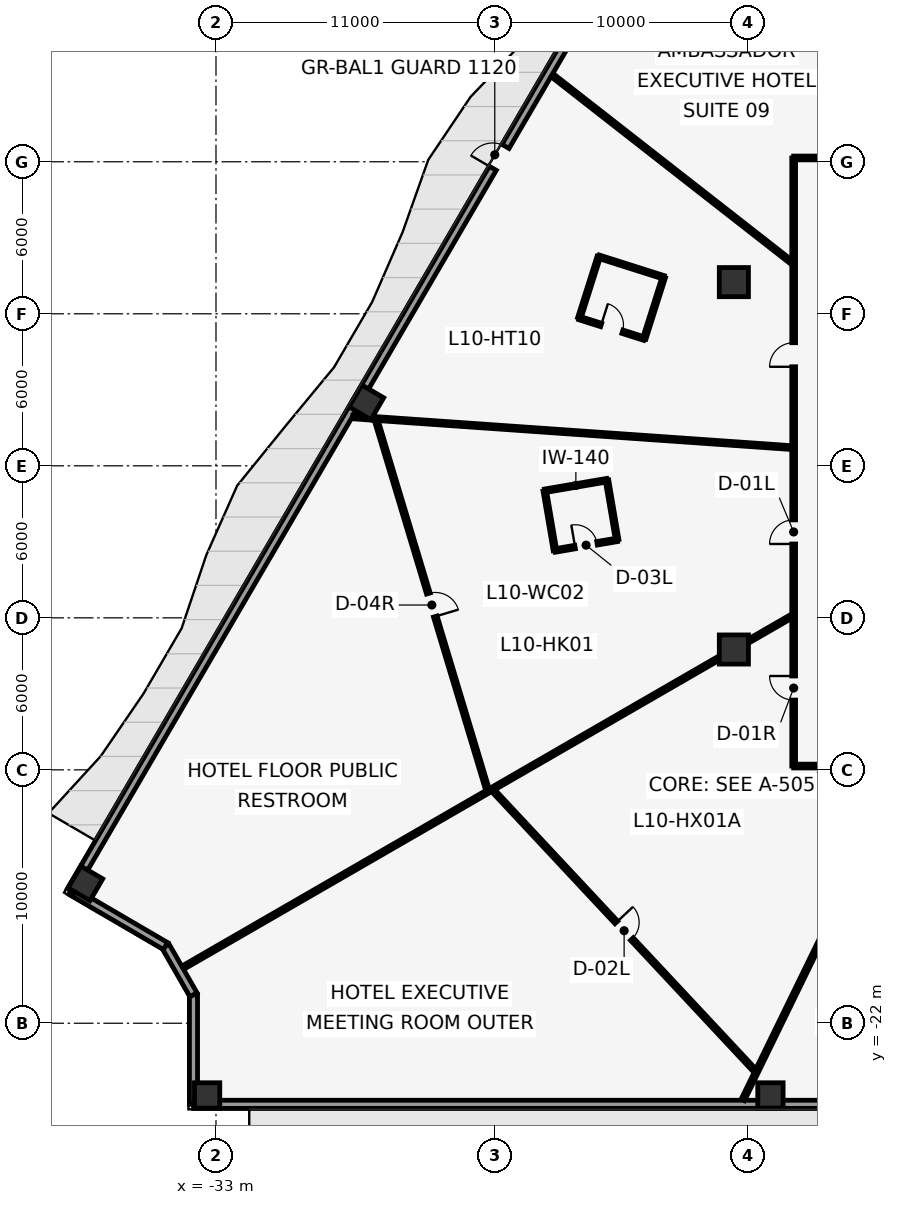
"""IFC4 building model, lengths in metres.
Left out: names, types, materials, properties, quantities, classifications, styles, units other than length and angle.
Written with IfcOpenShell. Run it as: python <this file> out.ifc"""

import sys

from ifc_helpers import new_model, si_unit, direction, frame, frame_2d, origin, origin_2d, place, context, subcontext, project, spatial, rectangle, hollow_rectangle, extrude, element, fill, save


model = new_model("IFC4")
c1 = context("Model", 3, precision=1e-05, world=origin(), true_north=direction((0.0, 1.0)))
c2 = subcontext(c1, "Body", "Model", "MODEL_VIEW")
j1 = project(units=[si_unit("LENGTHUNIT", "METRE"), si_unit("PLANEANGLEUNIT", "RADIAN")], contexts=[c1])
p1 = place(None, origin())
s1 = spatial("IfcSite", under=j1, at=p1, CompositionType="ELEMENT")
p2 = place(p1, origin())
s2 = spatial("IfcBuilding", under=s1, at=p2, CompositionType="ELEMENT")
p3 = place(p2, frame((0.0, 0.0, 50.4)))
s3 = spatial("IfcBuildingStorey", under=s2, at=p3, CompositionType="ELEMENT", Elevation=50.4)
for number, where, z_axis, x_axis in (
    (1, (-12.56, -7.25, 0.0), (0.0, 0.0, 1.0), (1.0, 0.0, 0.0)),
    (2, (-12.56, 7.25, 0.0), (0.0, 0.0, 1.0), (1.0, 0.0, 0.0)),
):
    element("IfcColumn", number, at=place(p3, frame(where, z_axis=z_axis, x_axis=x_axis)), inside=s3, PredefinedType="COLUMN", context=c2, shape_type="SweptSolid", body=[
        extrude(rectangle(XDim=1.15, YDim=1.15, at=origin_2d()), origin(), (0.0, 0.0, 1.0), 4.0),
    ])
for number, where, z_axis, x_axis in (
    (3, (-27.065, 2.506, 0.0), (0.0, 0.0, 1.0), (0.504, 0.863, 0.0)),
    (4, (-38.154, -16.481, 0.0), (0.0, 0.0, 1.0), (0.504, 0.863, 0.0)),
    (5, (-33.35, -24.85, 0.0), (0.0, 0.0, 1.0), (1.0, 0.0, 0.0)),
    (6, (-11.117, -24.85, 0.0), (0.0, 0.0, 1.0), (1.0, 0.0, 0.0)),
):
    element("IfcColumn", number, at=place(p3, frame(where, z_axis=z_axis, x_axis=x_axis)), inside=s3, PredefinedType="COLUMN", context=c2, shape_type="SweptSolid", body=[
        extrude(hollow_rectangle(XDim=1.0, YDim=1.0, WallThickness=0.06, at=origin_2d()), origin(), (0.0, 0.0, 1.0), 4.0),
    ])
p4 = place(p3, frame((33.888, -25.2, 0.0), z_axis=(0.0, 0.0, 1.0), x_axis=(-1.0, 0.0, 0.0)))
e7 = element("IfcWall", 7, at=p4, inside=s3, PredefinedType="STANDARD", context=c2, shape_type="SweptSolid", body=[
    extrude(rectangle(XDim=67.776, YDim=0.32, at=frame_2d((33.888, 0.0))), origin(), (0.0, 0.0, 1.0), 3.75),
])
p5 = place(p4, frame((33.388, 0.0, 0.0)))
e8 = element("IfcOpeningElement", 8, at=p5, cuts=e7, PredefinedType="OPENING", context=c2, shape_type="SweptSolid", body=[
    extrude(rectangle(XDim=1.0, YDim=2.15, at=frame_2d((0.5, 1.075))), frame((0.0, 0.17, 0.0), z_axis=(0.0, -1.0, 0.0), x_axis=(1.0, 0.0, 0.0)), (0.0, 0.0, 1.0), 0.34),
])
p6 = place(p3, frame((-33.888, -25.2, 0.0), z_axis=(0.0, 0.0, 1.0), x_axis=(0.0, 1.0, 0.0)))
e9 = element("IfcWall", 9, at=p6, inside=s3, PredefinedType="STANDARD", context=c2, shape_type="SweptSolid", body=[
    extrude(rectangle(XDim=4.324, YDim=0.32, at=frame_2d((2.162, 0.0))), origin(), (0.0, 0.0, 1.0), 3.75),
])
p7 = place(p3, frame((-33.888, -20.876, 0.0), z_axis=(0.0, 0.0, 1.0), x_axis=(-0.497881323344, 0.867245171717, 0.0)))
e10 = element("IfcWall", 10, at=p7, inside=s3, PredefinedType="STANDARD", context=c2, shape_type="SweptSolid", body=[
    extrude(rectangle(XDim=2.217, YDim=0.32, at=frame_2d((1.108, 0.0))), origin(), (0.0, 0.0, 1.0), 3.75),
])
p8 = place(p3, frame((-34.992, -18.954, 0.0), z_axis=(0.0, 0.0, 1.0), x_axis=(-0.863569936823, 0.504229079105, 0.0)))
e11 = element("IfcWall", 11, at=p8, inside=s3, PredefinedType="STANDARD", context=c2, shape_type="SweptSolid", body=[
    extrude(rectangle(XDim=4.324, YDim=0.32, at=frame_2d((2.162, 0.0))), origin(), (0.0, 0.0, 1.0), 3.75),
])
p9 = place(p3, frame((-38.726, -16.773, 0.0), z_axis=(0.0, 0.0, 1.0), x_axis=(0.504213113214, 0.863579258935, 0.0)))
e12 = element("IfcWall", 12, at=p9, inside=s3, PredefinedType="STANDARD", context=c2, shape_type="SweptSolid", body=[
    extrude(rectangle(XDim=67.041, YDim=0.32, at=frame_2d((33.521, 0.0))), origin(), (0.0, 0.0, 1.0), 3.75),
])
p10 = place(p9, frame((33.021, 0.0, 0.0)))
e13 = element("IfcOpeningElement", 13, at=p10, cuts=e12, PredefinedType="OPENING", context=c2, shape_type="SweptSolid", body=[
    extrude(rectangle(XDim=1.0, YDim=2.15, at=frame_2d((0.5, 1.075))), frame((0.0, 0.17, 0.0), z_axis=(0.0, -1.0, 0.0), x_axis=(1.0, 0.0, 0.0)), (0.0, 0.0, 1.0), 0.34),
])
p11 = place(p3, frame((-10.2, 12.15, 0.0), z_axis=(0.0, 0.0, 1.0), x_axis=(1.0, 0.0, 0.0)))
e14 = element("IfcWall", 14, at=p11, inside=s3, PredefinedType="PARTITIONING", context=c2, shape_type="SweptSolid", body=[
    extrude(rectangle(XDim=20.4, YDim=0.15, at=frame_2d((10.2, 0.0))), origin(), (0.0, 0.0, 1.0), 3.75),
])
p12 = place(p11, frame((15.998, 0.0, 0.0)))
e15 = element("IfcOpeningElement", 15, at=p12, cuts=e14, PredefinedType="OPENING", context=c2, shape_type="SweptSolid", body=[
    extrude(rectangle(XDim=0.95, YDim=2.15, at=frame_2d((0.475, 1.075))), frame((0.0, 0.085, 0.0), z_axis=(0.0, -1.0, 0.0), x_axis=(1.0, 0.0, 0.0)), (0.0, 0.0, 1.0), 0.17),
])
p13 = place(p11, frame((9.038, 0.0, 0.0)))
e16 = element("IfcOpeningElement", 16, at=p13, cuts=e14, PredefinedType="OPENING", context=c2, shape_type="SweptSolid", body=[
    extrude(rectangle(XDim=0.95, YDim=2.15, at=frame_2d((0.475, 1.075))), frame((0.0, 0.085, 0.0), z_axis=(0.0, -1.0, 0.0), x_axis=(1.0, 0.0, 0.0)), (0.0, 0.0, 1.0), 0.17),
])
p14 = place(p11, frame((2.764, 0.0, 0.0)))
e17 = element("IfcOpeningElement", 17, at=p14, cuts=e14, PredefinedType="OPENING", context=c2, shape_type="SweptSolid", body=[
    extrude(rectangle(XDim=0.95, YDim=2.15, at=frame_2d((0.475, 1.075))), frame((0.0, 0.085, 0.0), z_axis=(0.0, -1.0, 0.0), x_axis=(1.0, 0.0, 0.0)), (0.0, 0.0, 1.0), 0.17),
])
p15 = place(p3, frame((10.2, -11.85, 0.0), z_axis=(0.0, 0.0, 1.0), x_axis=(-1.0, 0.0, 0.0)))
e18 = element("IfcWall", 18, at=p15, inside=s3, PredefinedType="PARTITIONING", context=c2, shape_type="SweptSolid", body=[
    extrude(rectangle(XDim=20.4, YDim=0.15, at=frame_2d((10.2, 0.0))), origin(), (0.0, 0.0, 1.0), 3.75),
])
p16 = place(p15, frame((11.796, 0.0, 0.0)))
e19 = element("IfcOpeningElement", 19, at=p16, cuts=e18, PredefinedType="OPENING", context=c2, shape_type="SweptSolid", body=[
    extrude(rectangle(XDim=0.95, YDim=2.15, at=frame_2d((0.475, 1.075))), frame((0.0, 0.085, 0.0), z_axis=(0.0, -1.0, 0.0), x_axis=(1.0, 0.0, 0.0)), (0.0, 0.0, 1.0), 0.17),
])
p17 = place(p15, frame((3.913, 0.0, 0.0)))
e20 = element("IfcOpeningElement", 20, at=p17, cuts=e18, PredefinedType="OPENING", context=c2, shape_type="SweptSolid", body=[
    extrude(rectangle(XDim=0.95, YDim=2.15, at=frame_2d((0.475, 1.075))), frame((0.0, 0.085, 0.0), z_axis=(0.0, -1.0, 0.0), x_axis=(1.0, 0.0, 0.0)), (0.0, 0.0, 1.0), 0.17),
])
p18 = place(p3, frame((-10.2, -11.85, 0.0), z_axis=(0.0, 0.0, 1.0), x_axis=(0.0, 1.0, 0.0)))
e21 = element("IfcWall", 21, at=p18, inside=s3, PredefinedType="PARTITIONING", context=c2, shape_type="SweptSolid", body=[
    extrude(rectangle(XDim=24.0, YDim=0.15, at=frame_2d((12.0, 0.0))), origin(), (0.0, 0.0, 1.0), 3.75),
])
p19 = place(p18, frame((8.765, 0.0, 0.0)))
e22 = element("IfcOpeningElement", 22, at=p19, cuts=e21, PredefinedType="OPENING", context=c2, shape_type="SweptSolid", body=[
    extrude(rectangle(XDim=0.95, YDim=2.15, at=frame_2d((0.475, 1.075))), frame((0.0, 0.085, 0.0), z_axis=(0.0, -1.0, 0.0), x_axis=(1.0, 0.0, 0.0)), (0.0, 0.0, 1.0), 0.17),
])
p20 = place(p18, frame((2.604, 0.0, 0.0)))
e23 = element("IfcOpeningElement", 23, at=p20, cuts=e21, PredefinedType="OPENING", context=c2, shape_type="SweptSolid", body=[
    extrude(rectangle(XDim=0.95, YDim=2.15, at=frame_2d((0.475, 1.075))), frame((0.0, 0.085, 0.0), z_axis=(0.0, -1.0, 0.0), x_axis=(1.0, 0.0, 0.0)), (0.0, 0.0, 1.0), 0.17),
])
p21 = place(p18, frame((15.759, 0.0, 0.0)))
e24 = element("IfcOpeningElement", 24, at=p21, cuts=e21, PredefinedType="OPENING", context=c2, shape_type="SweptSolid", body=[
    extrude(rectangle(XDim=0.95, YDim=2.15, at=frame_2d((0.475, 1.075))), frame((0.0, 0.085, 0.0), z_axis=(0.0, -1.0, 0.0), x_axis=(1.0, 0.0, 0.0)), (0.0, 0.0, 1.0), 0.17),
])
p22 = place(p3, frame((-3.982, 12.255, 0.0), z_axis=(0.0, 0.0, 1.0), x_axis=(-0.309011216684, 0.951058393561, 0.0)))
e25 = element("IfcWall", 25, at=p22, inside=s3, PredefinedType="PARTITIONING", context=c2, shape_type="SweptSolid", body=[
    extrude(rectangle(XDim=20.354, YDim=0.15, at=frame_2d((10.177, 0.0))), origin(), (0.0, 0.0, 1.0), 3.75),
])
p23 = place(p3, frame((-10.305, 8.051, 0.0), z_axis=(0.0, 0.0, 1.0), x_axis=(-0.788008281042, 0.615664640051, 0.0)))
e26 = element("IfcWall", 26, at=p23, inside=s3, PredefinedType="PARTITIONING", context=c2, shape_type="SweptSolid", body=[
    extrude(rectangle(XDim=11.96, YDim=0.15, at=frame_2d((5.98, 0.0))), origin(), (0.0, 0.0, 1.0), 3.75),
])
p24 = place(p3, frame((-10.305, 0.721, 0.0), z_axis=(0.0, 0.0, 1.0), x_axis=(-0.997564495515, 0.069750106007, 0.0)))
e27 = element("IfcWall", 27, at=p24, inside=s3, PredefinedType="PARTITIONING", context=c2, shape_type="SweptSolid", body=[
    extrude(rectangle(XDim=17.34, YDim=0.15, at=frame_2d((8.67, 0.0))), origin(), (0.0, 0.0, 1.0), 3.75),
])
p25 = place(p3, frame((-10.305, -5.95, 0.0), z_axis=(0.0, 0.0, 1.0), x_axis=(-0.866026683055, -0.499997784232, 0.0)))
e28 = element("IfcWall", 28, at=p25, inside=s3, PredefinedType="PARTITIONING", context=c2, shape_type="SweptSolid", body=[
    extrude(rectangle(XDim=27.709, YDim=0.15, at=frame_2d((13.854, 0.0))), origin(), (0.0, 0.0, 1.0), 2.798),
])
p26 = place(p3, frame((-5.831, -11.955, 0.0), z_axis=(0.0, 0.0, 1.0), x_axis=(-0.438380960837, -0.898789259602, 0.0)))
e29 = element("IfcWall", 29, at=p26, inside=s3, PredefinedType="PARTITIONING", context=c2, shape_type="SweptSolid", body=[
    extrude(rectangle(XDim=14.542, YDim=0.15, at=frame_2d((7.271, 0.0))), origin(), (0.0, 0.0, 1.0), 3.75),
])
p27 = place(p3, frame((-26.691, 1.841, 0.0), z_axis=(0.0, 0.0, 1.0), x_axis=(0.28842068966, -0.957503788909, 0.0)))
e30 = element("IfcWall", 30, at=p27, inside=s3, PredefinedType="PARTITIONING", context=c2, shape_type="SweptSolid", body=[
    extrude(rectangle(XDim=15.322, YDim=0.15, at=frame_2d((7.661, 0.0))), origin(), (0.0, 0.0, 1.0), 3.75),
])
p28 = place(p27, frame((7.186, 0.0, 0.0)))
e31 = element("IfcOpeningElement", 31, at=p28, cuts=e30, PredefinedType="OPENING", context=c2, shape_type="SweptSolid", body=[
    extrude(rectangle(XDim=0.95, YDim=2.15, at=frame_2d((0.475, 1.075))), frame((0.0, 0.085, 0.0), z_axis=(0.0, -1.0, 0.0), x_axis=(1.0, 0.0, 0.0)), (0.0, 0.0, 1.0), 0.17),
])
p29 = place(p3, frame((-17.569, -0.566, 0.0), z_axis=(0.0, 0.0, 1.0), x_axis=(-0.985693546415, -0.168547419306, 0.0)))
e32 = element("IfcWall", 32, at=p29, inside=s3, PredefinedType="PARTITIONING", context=c2, shape_type="SweptSolid", body=[
    extrude(rectangle(XDim=2.49, YDim=0.14, at=frame_2d((1.245, 0.0))), origin(), (0.0, 0.0, 1.0), 3.75),
])
p30 = place(p3, frame((-20.023, -0.986, 0.0), z_axis=(0.0, 0.0, 1.0), x_axis=(0.168456250153, -0.98570913143, 0.0)))
e33 = element("IfcWall", 33, at=p30, inside=s3, PredefinedType="PARTITIONING", context=c2, shape_type="SweptSolid", body=[
    extrude(rectangle(XDim=2.39, YDim=0.14, at=frame_2d((1.195, 0.0))), origin(), (0.0, 0.0, 1.0), 3.75),
])
p31 = place(p3, frame((-19.621, -3.342, 0.0), z_axis=(0.0, 0.0, 1.0), x_axis=(0.985709831675, 0.168452152673, 0.0)))
e34 = element("IfcWall", 34, at=p31, inside=s3, PredefinedType="PARTITIONING", context=c2, shape_type="SweptSolid", body=[
    extrude(rectangle(XDim=2.49, YDim=0.14, at=frame_2d((1.245, 0.0))), origin(), (0.0, 0.0, 1.0), 3.75),
])
p32 = place(p31, frame((0.805, 0.0, 0.0)))
e35 = element("IfcOpeningElement", 35, at=p32, cuts=e34, PredefinedType="OPENING", context=c2, shape_type="SweptSolid", body=[
    extrude(rectangle(XDim=0.88, YDim=2.1, at=frame_2d((0.44, 1.05))), frame((0.0, 0.08, 0.0), z_axis=(0.0, -1.0, 0.0), x_axis=(1.0, 0.0, 0.0)), (0.0, 0.0, 1.0), 0.16),
])
p33 = place(p3, frame((-17.166, -2.922, 0.0), z_axis=(0.0, 0.0, 1.0), x_axis=(-0.168439288847, 0.985712029942, 0.0)))
e36 = element("IfcWall", 36, at=p33, inside=s3, PredefinedType="PARTITIONING", context=c2, shape_type="SweptSolid", body=[
    extrude(rectangle(XDim=2.39, YDim=0.14, at=frame_2d((1.195, 0.0))), origin(), (0.0, 0.0, 1.0), 3.75),
])
p34 = place(p3, frame((-22.091, -12.783, 0.0), z_axis=(0.0, 0.0, 1.0), x_axis=(0.682691040269, -0.730707153062, 0.0)))
e37 = element("IfcWall", 37, at=p34, inside=s3, PredefinedType="PARTITIONING", context=c2, shape_type="SweptSolid", body=[
    extrude(rectangle(XDim=15.233, YDim=0.15, at=frame_2d((7.617, 0.0))), origin(), (0.0, 0.0, 1.0), 3.75),
])
p35 = place(p34, frame((7.167, 0.0, 0.0)))
e38 = element("IfcOpeningElement", 38, at=p35, cuts=e37, PredefinedType="OPENING", context=c2, shape_type="SweptSolid", body=[
    extrude(rectangle(XDim=0.9, YDim=2.1, at=frame_2d((0.45, 1.05))), frame((0.0, 0.085, 0.0), z_axis=(0.0, -1.0, 0.0), x_axis=(1.0, 0.0, 0.0)), (0.0, 0.0, 1.0), 0.17),
])
p36 = place(p3, frame((-15.328, 7.44, 0.0), z_axis=(0.0, 0.0, 1.0), x_axis=(-0.953201932401, 0.302334377912, 0.0)))
e39 = element("IfcWall", 39, at=p36, inside=s3, PredefinedType="PARTITIONING", context=c2, shape_type="SweptSolid", body=[
    extrude(rectangle(XDim=2.69, YDim=0.14, at=frame_2d((1.345, 0.0))), origin(), (0.0, 0.0, 1.0), 3.75),
])
p37 = place(p3, frame((-17.892, 8.253, 0.0), z_axis=(0.0, 0.0, 1.0), x_axis=(-0.302469641391, -0.953159019281, 0.0)))
e40 = element("IfcWall", 40, at=p37, inside=s3, PredefinedType="PARTITIONING", context=c2, shape_type="SweptSolid", body=[
    extrude(rectangle(XDim=2.54, YDim=0.14, at=frame_2d((1.27, 0.0))), origin(), (0.0, 0.0, 1.0), 3.254),
])
p38 = place(p3, frame((-18.66, 5.832, 0.0), z_axis=(0.0, 0.0, 1.0), x_axis=(0.953210227692, -0.302308223216, 0.0)))
e41 = element("IfcWall", 41, at=p38, inside=s3, PredefinedType="PARTITIONING", context=c2, shape_type="SweptSolid", body=[
    extrude(rectangle(XDim=2.69, YDim=0.14, at=frame_2d((1.345, 0.0))), origin(), (0.0, 0.0, 1.0), 3.75),
])
p39 = place(p38, frame((0.905, 0.0, 0.0)))
e42 = element("IfcOpeningElement", 42, at=p39, cuts=e41, PredefinedType="OPENING", context=c2, shape_type="SweptSolid", body=[
    extrude(rectangle(XDim=0.88, YDim=2.1, at=frame_2d((0.44, 1.05))), frame((0.0, 0.08, 0.0), z_axis=(0.0, -1.0, 0.0), x_axis=(1.0, 0.0, 0.0)), (0.0, 0.0, 1.0), 0.16),
])
p40 = place(p3, frame((-16.096, 5.019, 0.0), z_axis=(0.0, 0.0, 1.0), x_axis=(0.302382317173, 0.953186725811, 0.0)))
e43 = element("IfcWall", 43, at=p40, inside=s3, PredefinedType="PARTITIONING", context=c2, shape_type="SweptSolid", body=[
    extrude(rectangle(XDim=2.54, YDim=0.14, at=frame_2d((1.27, 0.0))), origin(), (0.0, 0.0, 1.0), 3.75),
])
p41 = place(p10, origin())
e44 = element("IfcDoor", 44, at=p41, inside=s3, OperationType="SINGLE_SWING_LEFT", PredefinedType="DOOR", context=c2, shape_type="SweptSolid", body=[
    extrude(rectangle(XDim=1.0, YDim=2.15, at=frame_2d((0.5, 1.075))), frame((0.0, 0.025, 0.0), z_axis=(0.0, -1.0, 0.0), x_axis=(1.0, 0.0, 0.0)), (0.0, 0.0, 1.0), 0.05),
])
fill(e13, e44)
p42 = place(p28, origin())
e45 = element("IfcDoor", 45, at=p42, inside=s3, OperationType="SINGLE_SWING_RIGHT", PredefinedType="DOOR", context=c2, shape_type="SweptSolid", body=[
    extrude(rectangle(XDim=0.95, YDim=2.15, at=frame_2d((0.475, 1.075))), frame((0.0, 0.025, 0.0), z_axis=(0.0, -1.0, 0.0), x_axis=(1.0, 0.0, 0.0)), (0.0, 0.0, 1.0), 0.05),
])
fill(e31, e45)
p43 = place(p32, origin())
e46 = element("IfcDoor", 46, at=p43, inside=s3, OperationType="SINGLE_SWING_LEFT", PredefinedType="DOOR", context=c2, shape_type="SweptSolid", body=[
    extrude(rectangle(XDim=0.88, YDim=2.1, at=frame_2d((0.44, 1.05))), frame((0.0, 0.025, 0.0), z_axis=(0.0, -1.0, 0.0), x_axis=(1.0, 0.0, 0.0)), (0.0, 0.0, 1.0), 0.05),
])
fill(e35, e46)
p44 = place(p35, origin())
e47 = element("IfcDoor", 47, at=p44, inside=s3, OperationType="SINGLE_SWING_LEFT", PredefinedType="DOOR", context=c2, shape_type="SweptSolid", body=[
    extrude(rectangle(XDim=0.9, YDim=2.1, at=frame_2d((0.45, 1.05))), frame((0.0, 0.025, 0.0), z_axis=(0.0, -1.0, 0.0), x_axis=(1.0, 0.0, 0.0)), (0.0, 0.0, 1.0), 0.05),
])
fill(e38, e47)
p45 = place(p39, origin())
e48 = element("IfcDoor", 48, at=p45, inside=s3, OperationType="SINGLE_SWING_LEFT", PredefinedType="DOOR", context=c2, shape_type="SweptSolid", body=[
    extrude(rectangle(XDim=0.88, YDim=2.1, at=frame_2d((0.44, 1.05))), frame((0.0, 0.025, 0.0), z_axis=(0.0, -1.0, 0.0), x_axis=(1.0, 0.0, 0.0)), (0.0, 0.0, 1.0), 0.05),
])
fill(e42, e48)
p46 = place(p19, origin())
e49 = element("IfcDoor", 49, at=p46, inside=s3, OperationType="SINGLE_SWING_LEFT", PredefinedType="DOOR", context=c2, shape_type="SweptSolid", body=[
    extrude(rectangle(XDim=0.95, YDim=2.15, at=frame_2d((0.475, 1.075))), frame((0.0, 0.025, 0.0), z_axis=(0.0, -1.0, 0.0), x_axis=(1.0, 0.0, 0.0)), (0.0, 0.0, 1.0), 0.05),
])
fill(e22, e49)
p47 = place(p20, origin())
e50 = element("IfcDoor", 50, at=p47, inside=s3, OperationType="SINGLE_SWING_RIGHT", PredefinedType="DOOR", context=c2, shape_type="SweptSolid", body=[
    extrude(rectangle(XDim=0.95, YDim=2.15, at=frame_2d((0.475, 1.075))), frame((0.0, 0.025, 0.0), z_axis=(0.0, -1.0, 0.0), x_axis=(1.0, 0.0, 0.0)), (0.0, 0.0, 1.0), 0.05),
])
fill(e23, e50)
p48 = place(p21, origin())
e51 = element("IfcDoor", 51, at=p48, inside=s3, OperationType="SINGLE_SWING_LEFT", PredefinedType="DOOR", context=c2, shape_type="SweptSolid", body=[
    extrude(rectangle(XDim=0.95, YDim=2.15, at=frame_2d((0.475, 1.075))), frame((0.0, 0.025, 0.0), z_axis=(0.0, -1.0, 0.0), x_axis=(1.0, 0.0, 0.0)), (0.0, 0.0, 1.0), 0.05),
])
fill(e24, e51)
save(model, sys.argv[1])
